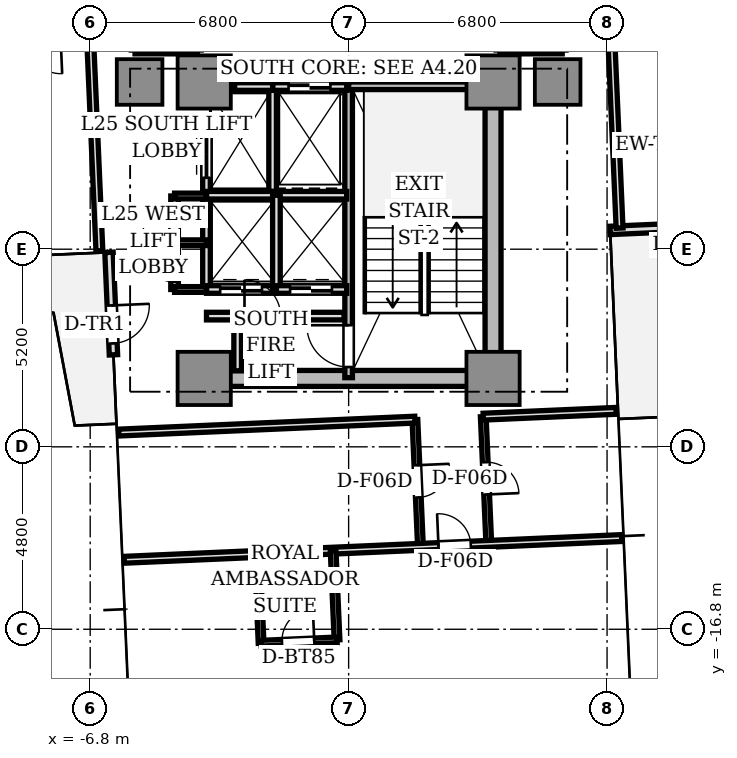
"""IFC4 building model, lengths in metres.
Left out: names, types, materials, properties, quantities, classifications, styles, units other than length and angle.
Written with IfcOpenShell. Run it as: python <this file> out.ifc"""

import sys

from ifc_helpers import new_model, si_unit, direction, frame, frame_2d, origin, origin_2d, place, context, subcontext, project, spatial, rectangle, extrude, source, transform, mapped, element, fill, save


model = new_model("IFC4")
c1 = context("Model", 3, precision=1e-05, world=origin(), true_north=direction((0.0, 1.0)))
c2 = subcontext(c1, "Body", "Model", "MODEL_VIEW")
j1 = project(units=[si_unit("LENGTHUNIT", "METRE"), si_unit("PLANEANGLEUNIT", "RADIAN")], contexts=[c1])
p1 = place(None, origin())
s1 = spatial("IfcSite", under=j1, at=p1, CompositionType="ELEMENT")
p2 = place(p1, origin())
s2 = spatial("IfcBuilding", under=s1, at=p2, CompositionType="ELEMENT")
p3 = place(p2, frame((0.0, 0.0, 93.55)))
s3 = spatial("IfcBuildingStorey", under=s2, at=p3, CompositionType="ELEMENT", Elevation=93.55)
p4 = place(p3, frame((-3.55, -10.2, 0.0), z_axis=(0.0, 0.0, 1.0), x_axis=(1.0, 0.0, 0.0)))
e1 = element("IfcWall", 1, at=p4, inside=s3, PredefinedType="SHEAR", context=c2, shape_type="SweptSolid", body=[
    extrude(rectangle(XDim=7.1, YDim=0.42, at=frame_2d((3.55, 0.0))), origin(), (0.0, 0.0, 1.0), 3.11),
])
p5 = place(p3, frame((3.8, -9.75, 0.0), z_axis=(0.0, 0.0, 1.0), x_axis=(0.0, 1.0, 0.0)))
e2 = element("IfcWall", 2, at=p5, inside=s3, PredefinedType="SHEAR", context=c2, shape_type="SweptSolid", body=[
    extrude(rectangle(XDim=6.9, YDim=0.42, at=frame_2d((3.45, 0.0))), origin(), (0.0, 0.0, 1.0), 3.11),
])
m1 = source(origin(), c2, "Body", "SweptSolid", [
    extrude(rectangle(XDim=1.4, YDim=1.4, at=origin_2d()), origin(), (0.0, 0.0, 1.0), 3.11),
])
for number, where, z_axis, x_axis in (
    (3, (-3.8, -2.4, 0.0), (0.0, 0.0, 1.0), (1.0, 0.0, 0.0)),
    (4, (3.8, -2.4, 0.0), (0.0, 0.0, 1.0), (1.0, 0.0, 0.0)),
    (5, (-3.8, -10.2, 0.0), (0.0, 0.0, 1.0), (1.0, 0.0, 0.0)),
    (6, (3.8, -10.2, 0.0), (0.0, 0.0, 1.0), (1.0, 0.0, 0.0)),
):
    element("IfcColumn", number, at=place(p3, frame(where, z_axis=z_axis, x_axis=x_axis)), inside=s3, PredefinedType="COLUMN", context=c2, shape_type="MappedRepresentation", body=[
        mapped(m1, transform((0.0, 0.0, 0.0), scale=1.0)),
    ])
m2 = source(origin(), c2, "Body", "SweptSolid", [
    extrude(rectangle(XDim=1.2, YDim=1.2, at=origin_2d()), origin(), (0.0, 0.0, 1.0), 3.11),
])
for number, where, z_axis, x_axis in (
    (7, (5.5, -2.4, 0.0), (0.0, 0.0, 1.0), (1.0, 0.0, 0.0)),
    (8, (-5.5, -2.4, 0.0), (0.0, 0.0, 1.0), (1.0, 0.0, 0.0)),
):
    element("IfcColumn", number, at=place(p3, frame(where, z_axis=z_axis, x_axis=x_axis)), inside=s3, PredefinedType="COLUMN", context=c2, shape_type="MappedRepresentation", body=[
        mapped(m2, transform((0.0, 0.0, 0.0), scale=1.0)),
    ])
p6 = place(p3, frame((6.882, -6.306, 0.0), z_axis=(0.0, 0.0, 1.0), x_axis=(0.999045894436, 0.043672655174, 0.0)))
e9 = element("IfcWall", 9, at=p6, inside=s3, PredefinedType="STANDARD", context=c2, shape_type="SweptSolid", body=[
    extrude(rectangle(XDim=2.7, YDim=0.22, at=frame_2d((1.35, 0.0))), origin(), (0.0, 0.0, 1.0), 3.11),
])
p7 = place(p6, frame((1.4, 0.0, 0.0)))
e10 = element("IfcOpeningElement", 10, at=p7, cuts=e9, PredefinedType="OPENING", context=c2, shape_type="SweptSolid", body=[
    extrude(rectangle(XDim=1.0, YDim=2.2, at=frame_2d((0.5, 1.1))), frame((0.0, 0.12, 0.0), z_axis=(0.0, -1.0, 0.0), x_axis=(1.0, 0.0, 0.0)), (0.0, 0.0, 1.0), 0.24),
])
p8 = place(p3, frame((-6.306, -6.882, 0.0), z_axis=(0.0, 0.0, 1.0), x_axis=(0.043672655174, -0.999045894436, 0.0)))
e11 = element("IfcWall", 11, at=p8, inside=s3, PredefinedType="STANDARD", context=c2, shape_type="SweptSolid", body=[
    extrude(rectangle(XDim=2.7, YDim=0.22, at=frame_2d((1.35, 0.0))), origin(), (0.0, 0.0, 1.0), 3.11),
])
p9 = place(p8, frame((1.4, 0.0, 0.0)))
e12 = element("IfcOpeningElement", 12, at=p9, cuts=e11, PredefinedType="OPENING", context=c2, shape_type="SweptSolid", body=[
    extrude(rectangle(XDim=1.0, YDim=2.2, at=frame_2d((0.5, 1.1))), frame((0.0, 0.12, 0.0), z_axis=(0.0, -1.0, 0.0), x_axis=(1.0, 0.0, 0.0)), (0.0, 0.0, 1.0), 0.24),
])
p10 = place(p3, frame((0.0, -10.18, 0.0), z_axis=(0.0, 0.0, 1.0), x_axis=(0.0, 1.0, 0.0)))
e13 = element("IfcWall", 13, at=p10, inside=s3, PredefinedType="SOLIDWALL", context=c2, shape_type="SweptSolid", body=[
    extrude(rectangle(XDim=7.68, YDim=0.2, at=frame_2d((3.84, 0.0))), origin(), (0.0, 0.0, 1.0), 3.11),
])
p11 = place(p10, frame((0.28, 0.0, 0.0)))
e14 = element("IfcOpeningElement", 14, at=p11, cuts=e13, PredefinedType="OPENING", context=c2, shape_type="SweptSolid", body=[
    extrude(rectangle(XDim=1.1, YDim=2.15, at=frame_2d((0.55, 1.075))), frame((0.0, 0.11, 0.0), z_axis=(0.0, -1.0, 0.0), x_axis=(1.0, 0.0, 0.0)), (0.0, 0.0, 1.0), 0.22),
])
p12 = place(p3, frame((0.0, -2.5, 0.0), z_axis=(0.0, 0.0, 1.0), x_axis=(1.0, 0.0, 0.0)))
e15 = element("IfcWall", 15, at=p12, inside=s3, PredefinedType="SOLIDWALL", context=c2, shape_type="SweptSolid", body=[
    extrude(rectangle(XDim=3.72, YDim=0.2, at=frame_2d((1.86, 0.0))), origin(), (0.0, 0.0, 1.0), 3.11),
])
p13 = place(p3, frame((-2.0, -5.28, 0.0), z_axis=(0.0, 0.0, 1.0), x_axis=(0.0, 1.0, 0.0)))
e16 = element("IfcWall", 16, at=p13, inside=s3, PredefinedType="SOLIDWALL", context=c2, shape_type="SweptSolid", body=[
    extrude(rectangle(XDim=2.78, YDim=0.2, at=frame_2d((1.39, 0.0))), origin(), (0.0, 0.0, 1.0), 2.66),
])
p14 = place(p3, frame((-2.0, -2.52, 0.0), z_axis=(0.0, 0.0, 1.0), x_axis=(1.0, 0.0, 0.0)))
e17 = element("IfcWall", 17, at=p14, inside=s3, PredefinedType="SOLIDWALL", context=c2, shape_type="SweptSolid", body=[
    extrude(rectangle(XDim=1.95, YDim=0.2, at=frame_2d((0.975, 0.0))), origin(), (0.0, 0.0, 1.0), 2.66),
])
p15 = place(p14, frame((0.42, 0.0, 0.0)))
e18 = element("IfcOpeningElement", 18, at=p15, cuts=e17, PredefinedType="OPENING", context=c2, shape_type="SweptSolid", body=[
    extrude(rectangle(XDim=1.1, YDim=2.2, at=frame_2d((0.55, 1.1))), frame((0.0, 0.11, 0.0), z_axis=(0.0, -1.0, 0.0), x_axis=(1.0, 0.0, 0.0)), (0.0, 0.0, 1.0), 0.22),
])
p16 = place(p3, frame((-3.0, -2.52, 0.0), z_axis=(0.0, 0.0, 1.0), x_axis=(1.0, 0.0, 0.0)))
e19 = element("IfcWall", 19, at=p16, inside=s3, PredefinedType="SOLIDWALL", context=c2, shape_type="SweptSolid", body=[
    extrude(rectangle(XDim=1.0, YDim=0.2, at=frame_2d((0.5, 0.0))), origin(), (0.0, 0.0, 1.0), 2.66),
])
p17 = place(p3, frame((-3.74, -5.36, 0.0), z_axis=(0.0, 0.0, 1.0), x_axis=(0.0, 1.0, 0.0)))
e20 = element("IfcWall", 20, at=p17, inside=s3, PredefinedType="SOLIDWALL", context=c2, shape_type="SweptSolid", body=[
    extrude(rectangle(XDim=2.08, YDim=0.2, at=frame_2d((1.04, 0.0))), origin(), (0.0, 0.0, 1.0), 2.66),
])
p18 = place(p17, frame((0.44, 0.0, 0.0)))
e21 = element("IfcOpeningElement", 21, at=p18, cuts=e20, PredefinedType="OPENING", context=c2, shape_type="SweptSolid", body=[
    extrude(rectangle(XDim=1.2, YDim=2.2, at=frame_2d((0.6, 1.1))), frame((0.0, 0.11, 0.0), z_axis=(0.0, -1.0, 0.0), x_axis=(1.0, 0.0, 0.0)), (0.0, 0.0, 1.0), 0.22),
])
p19 = place(p3, frame((-3.74, -7.86, 0.0), z_axis=(0.0, 0.0, 1.0), x_axis=(0.0, 1.0, 0.0)))
e22 = element("IfcWall", 22, at=p19, inside=s3, PredefinedType="SOLIDWALL", context=c2, shape_type="SweptSolid", body=[
    extrude(rectangle(XDim=2.48, YDim=0.2, at=frame_2d((1.24, 0.0))), origin(), (0.0, 0.0, 1.0), 2.66),
])
p20 = place(p3, frame((-3.74, -7.86, 0.0), z_axis=(0.0, 0.0, 1.0), x_axis=(1.0, 0.0, 0.0)))
e23 = element("IfcWall", 23, at=p20, inside=s3, PredefinedType="SOLIDWALL", context=c2, shape_type="SweptSolid", body=[
    extrude(rectangle(XDim=1.84, YDim=0.2, at=frame_2d((0.92, 0.0))), origin(), (0.0, 0.0, 1.0), 2.66),
])
p21 = place(p20, frame((0.36, 0.0, 0.0)))
e24 = element("IfcOpeningElement", 24, at=p21, cuts=e23, PredefinedType="OPENING", context=c2, shape_type="SweptSolid", body=[
    extrude(rectangle(XDim=1.1, YDim=2.2, at=frame_2d((0.55, 1.1))), frame((0.0, 0.11, 0.0), z_axis=(0.0, -1.0, 0.0), x_axis=(1.0, 0.0, 0.0)), (0.0, 0.0, 1.0), 0.22),
])
p22 = place(p3, frame((-3.74, -5.38, 0.0), z_axis=(0.0, 0.0, 1.0), x_axis=(1.0, 0.0, 0.0)))
e25 = element("IfcWall", 25, at=p22, inside=s3, PredefinedType="SOLIDWALL", context=c2, shape_type="SweptSolid", body=[
    extrude(rectangle(XDim=3.69, YDim=0.2, at=frame_2d((1.845, 0.0))), origin(), (0.0, 0.0, 1.0), 2.66),
])
p23 = place(p3, frame((-1.9, -7.86, 0.0), z_axis=(0.0, 0.0, 1.0), x_axis=(0.0, 1.0, 0.0)))
e26 = element("IfcWall", 26, at=p23, inside=s3, PredefinedType="SOLIDWALL", context=c2, shape_type="SweptSolid", body=[
    extrude(rectangle(XDim=2.48, YDim=0.2, at=frame_2d((1.24, 0.0))), origin(), (0.0, 0.0, 1.0), 2.66),
])
p24 = place(p3, frame((-1.9, -7.86, 0.0), z_axis=(0.0, 0.0, 1.0), x_axis=(1.0, 0.0, 0.0)))
e27 = element("IfcWall", 27, at=p24, inside=s3, PredefinedType="SOLIDWALL", context=c2, shape_type="SweptSolid", body=[
    extrude(rectangle(XDim=1.85, YDim=0.2, at=frame_2d((0.925, 0.0))), origin(), (0.0, 0.0, 1.0), 2.66),
])
p25 = place(p24, frame((0.36, 0.0, 0.0)))
e28 = element("IfcOpeningElement", 28, at=p25, cuts=e27, PredefinedType="OPENING", context=c2, shape_type="SweptSolid", body=[
    extrude(rectangle(XDim=1.1, YDim=2.2, at=frame_2d((0.55, 1.1))), frame((0.0, 0.11, 0.0), z_axis=(0.0, -1.0, 0.0), x_axis=(1.0, 0.0, 0.0)), (0.0, 0.0, 1.0), 0.22),
])
for number, where, z_axis, x_axis in (
    (29, (3.98, -1.56, 0.0), (0.0, 0.0, 1.0), (1.0, 0.0, 0.0)),
    (30, (-5.62, -1.56, 0.0), (0.0, 0.0, 1.0), (1.0, 0.0, 0.0)),
):
    element("IfcWall", number, at=place(p3, frame(where, z_axis=z_axis, x_axis=x_axis)), inside=s3, PredefinedType="SOLIDWALL", context=c2, shape_type="SweptSolid", body=[
        extrude(rectangle(XDim=1.64, YDim=0.2, at=frame_2d((0.82, 0.0))), origin(), (0.0, 0.0, 1.0), 2.66),
    ])
p26 = place(p3, frame((-3.74, -8.56, 0.0), z_axis=(0.0, 0.0, 1.0), x_axis=(1.0, 0.0, 0.0)))
e31 = element("IfcWall", 31, at=p26, inside=s3, PredefinedType="SOLIDWALL", context=c2, shape_type="SweptSolid", body=[
    extrude(rectangle(XDim=3.62, YDim=0.2, at=frame_2d((1.81, 0.0))), origin(), (0.0, 0.0, 1.0), 2.66),
])
p27 = place(p26, frame((1.0, 0.0, 0.0)))
e32 = element("IfcOpeningElement", 32, at=p27, cuts=e31, PredefinedType="OPENING", context=c2, shape_type="SweptSolid", body=[
    extrude(rectangle(XDim=0.95, YDim=2.15, at=frame_2d((0.475, 1.075))), frame((0.0, 0.11, 0.0), z_axis=(0.0, -1.0, 0.0), x_axis=(1.0, 0.0, 0.0)), (0.0, 0.0, 1.0), 0.22),
])
p28 = place(p3, frame((-2.92, -10.0, 0.0), z_axis=(0.0, 0.0, 1.0), x_axis=(0.0, 1.0, 0.0)))
e33 = element("IfcWall", 33, at=p28, inside=s3, PredefinedType="SOLIDWALL", context=c2, shape_type="SweptSolid", body=[
    extrude(rectangle(XDim=1.44, YDim=0.2, at=frame_2d((0.72, 0.0))), origin(), (0.0, 0.0, 1.0), 2.66),
])
p29 = place(p3, frame((-4.58, -7.86, 0.0), z_axis=(0.0, 0.0, 1.0), x_axis=(0.0, 1.0, 0.0)))
e34 = element("IfcWall", 34, at=p29, inside=s3, PredefinedType="SOLIDWALL", context=c2, shape_type="SweptSolid", body=[
    extrude(rectangle(XDim=2.46, YDim=0.2, at=frame_2d((1.23, 0.0))), origin(), (0.0, 0.0, 1.0), 2.66),
])
p30 = place(p29, frame((0.2, 0.0, 0.0)))
e35 = element("IfcOpeningElement", 35, at=p30, cuts=e34, PredefinedType="OPENING", context=c2, shape_type="SweptSolid", body=[
    extrude(rectangle(XDim=0.85, YDim=2.1, at=frame_2d((0.425, 1.05))), frame((0.0, 0.11, 0.0), z_axis=(0.0, -1.0, 0.0), x_axis=(1.0, 0.0, 0.0)), (0.0, 0.0, 1.0), 0.22),
])
p31 = place(p29, frame((1.38, 0.0, 0.0)))
e36 = element("IfcOpeningElement", 36, at=p31, cuts=e34, PredefinedType="OPENING", context=c2, shape_type="SweptSolid", body=[
    extrude(rectangle(XDim=0.85, YDim=2.1, at=frame_2d((0.425, 1.05))), frame((0.0, 0.11, 0.0), z_axis=(0.0, -1.0, 0.0), x_axis=(1.0, 0.0, 0.0)), (0.0, 0.0, 1.0), 0.22),
])
for number, where, z_axis, x_axis in (
    (37, (-4.58, -5.4, 0.0), (0.0, 0.0, 1.0), (1.0, 0.0, 0.0)),
    (38, (-4.58, -7.86, 0.0), (0.0, 0.0, 1.0), (1.0, 0.0, 0.0)),
    (39, (-4.58, -6.63, 0.0), (0.0, 0.0, 1.0), (1.0, 0.0, 0.0)),
):
    element("IfcWall", number, at=place(p3, frame(where, z_axis=z_axis, x_axis=x_axis)), inside=s3, PredefinedType="PARTITIONING", context=c2, shape_type="SweptSolid", body=[
        extrude(rectangle(XDim=0.84, YDim=0.15, at=frame_2d((0.42, 0.0))), origin(), (0.0, 0.0, 1.0), 2.66),
    ])
p32 = place(p3, frame((7.129, -6.245, 0.0), z_axis=(0.0, 0.0, 1.0), x_axis=(-0.043608291235, 0.999048705988, 0.0)))
e40 = element("IfcWall", 40, at=p32, inside=s3, PredefinedType="PARTITIONING", context=c2, shape_type="SweptSolid", body=[
    extrude(rectangle(XDim=10.9, YDim=0.18, at=frame_2d((5.45, 0.0))), origin(), (0.0, 0.0, 1.0), 2.66),
])
p33 = place(p3, frame((-6.8, -1.298, 0.0), z_axis=(0.0, 0.0, 1.0), x_axis=(0.04359376056, -0.999049340143, 0.0)))
e41 = element("IfcWall", 41, at=p33, inside=s3, PredefinedType="PARTITIONING", context=c2, shape_type="SweptSolid", body=[
    extrude(rectangle(XDim=5.55, YDim=0.18, at=frame_2d((2.775, 0.0))), origin(), (0.0, 0.0, 1.0), 2.66),
])
p34 = place(p3, frame((3.542, -11.206, 0.0), z_axis=(0.0, 0.0, 1.0), x_axis=(0.043582710367, -0.99904982226, 0.0)))
e42 = element("IfcWall", 42, at=p34, inside=s3, PredefinedType="PARTITIONING", context=c2, shape_type="SweptSolid", body=[
    extrude(rectangle(XDim=3.35, YDim=0.15, at=frame_2d((1.675, 0.0))), origin(), (0.0, 0.0, 1.0), 2.66),
])
p35 = place(p34, frame((1.2, 0.0, 0.0)))
e43 = element("IfcOpeningElement", 43, at=p35, cuts=e42, PredefinedType="OPENING", context=c2, shape_type="SweptSolid", body=[
    extrude(rectangle(XDim=0.85, YDim=2.1, at=frame_2d((0.425, 1.05))), frame((0.0, 0.085, 0.0), z_axis=(0.0, -1.0, 0.0), x_axis=(1.0, 0.0, 0.0)), (0.0, 0.0, 1.0), 0.17),
])
p36 = place(p3, frame((1.744, -11.285, 0.0), z_axis=(0.0, 0.0, 1.0), x_axis=(0.043579537274, -0.999049960678, 0.0)))
e44 = element("IfcWall", 44, at=p36, inside=s3, PredefinedType="PARTITIONING", context=c2, shape_type="SweptSolid", body=[
    extrude(rectangle(XDim=3.35, YDim=0.15, at=frame_2d((1.675, 0.0))), origin(), (0.0, 0.0, 1.0), 2.66),
])
p37 = place(p36, frame((1.2, 0.0, 0.0)))
e45 = element("IfcOpeningElement", 45, at=p37, cuts=e44, PredefinedType="OPENING", context=c2, shape_type="SweptSolid", body=[
    extrude(rectangle(XDim=0.85, YDim=2.1, at=frame_2d((0.425, 1.05))), frame((0.0, 0.085, 0.0), z_axis=(0.0, -1.0, 0.0), x_axis=(1.0, 0.0, 0.0)), (0.0, 0.0, 1.0), 0.17),
])
p38 = place(p3, frame((3.542, -11.206, 0.0), z_axis=(0.0, 0.0, 1.0), x_axis=(0.999046129111, 0.04366728647, 0.0)))
e46 = element("IfcWall", 46, at=p38, inside=s3, PredefinedType="PARTITIONING", context=c2, shape_type="SweptSolid", body=[
    extrude(rectangle(XDim=3.5, YDim=0.18, at=frame_2d((1.75, 0.0))), origin(), (0.0, 0.0, 1.0), 2.66),
])
p39 = place(p3, frame((-6.049, -11.625, 0.0), z_axis=(0.0, 0.0, 1.0), x_axis=(0.999047634936, 0.043632821702, 0.0)))
e47 = element("IfcWall", 47, at=p39, inside=s3, PredefinedType="PARTITIONING", context=c2, shape_type="SweptSolid", body=[
    extrude(rectangle(XDim=7.8, YDim=0.18, at=frame_2d((3.9, 0.0))), origin(), (0.0, 0.0, 1.0), 2.66),
])
p40 = place(p3, frame((-5.903, -14.972, 0.0), z_axis=(0.0, 0.0, 1.0), x_axis=(0.999048653727, 0.043609488494, 0.0)))
e48 = element("IfcWall", 48, at=p40, inside=s3, PredefinedType="PARTITIONING", context=c2, shape_type="SweptSolid", body=[
    extrude(rectangle(XDim=13.1, YDim=0.18, at=frame_2d((6.55, 0.0))), origin(), (0.0, 0.0, 1.0), 2.66),
])
p41 = place(p40, frame((8.275, 0.0, 0.0)))
e49 = element("IfcOpeningElement", 49, at=p41, cuts=e48, PredefinedType="OPENING", context=c2, shape_type="SweptSolid", body=[
    extrude(rectangle(XDim=0.85, YDim=2.1, at=frame_2d((0.425, 1.05))), frame((0.0, 0.1, 0.0), z_axis=(0.0, -1.0, 0.0), x_axis=(1.0, 0.0, 0.0)), (0.0, 0.0, 1.0), 0.2),
])
p42 = place(p3, frame((-0.408, -14.732, 0.0), z_axis=(0.0, 0.0, 1.0), x_axis=(0.043527387554, -0.999052234136, 0.0)))
e50 = element("IfcWall", 50, at=p42, inside=s3, PredefinedType="PARTITIONING", context=c2, shape_type="SweptSolid", body=[
    extrude(rectangle(XDim=2.35, YDim=0.15, at=frame_2d((1.175, 0.0))), origin(), (0.0, 0.0, 1.0), 2.66),
])
p43 = place(p3, frame((-2.406, -14.819, 0.0), z_axis=(0.0, 0.0, 1.0), x_axis=(0.04363560271, -0.999047513473, 0.0)))
e51 = element("IfcWall", 51, at=p43, inside=s3, PredefinedType="PARTITIONING", context=c2, shape_type="SweptSolid", body=[
    extrude(rectangle(XDim=2.35, YDim=0.15, at=frame_2d((1.175, 0.0))), origin(), (0.0, 0.0, 1.0), 2.66),
])
p44 = place(p3, frame((-2.303, -17.167, 0.0), z_axis=(0.0, 0.0, 1.0), x_axis=(0.999049929275, 0.043580257179, 0.0)))
e52 = element("IfcWall", 52, at=p44, inside=s3, PredefinedType="PARTITIONING", context=c2, shape_type="SweptSolid", body=[
    extrude(rectangle(XDim=2.0, YDim=0.15, at=frame_2d((1.0, 0.0))), origin(), (0.0, 0.0, 1.0), 2.66),
])
p45 = place(p44, frame((0.55, 0.0, 0.0)))
e53 = element("IfcOpeningElement", 53, at=p45, cuts=e52, PredefinedType="OPENING", context=c2, shape_type="SweptSolid", body=[
    extrude(rectangle(XDim=0.85, YDim=2.1, at=frame_2d((0.425, 1.05))), frame((0.0, 0.085, 0.0), z_axis=(0.0, -1.0, 0.0), x_axis=(1.0, 0.0, 0.0)), (0.0, 0.0, 1.0), 0.17),
])
m3 = source(origin(), c2, "Body", "SweptSolid", [
    extrude(rectangle(XDim=1.0, YDim=0.05, at=origin_2d()), origin(), (0.0, 0.0, 1.0), 2.2),
])
p46 = place(p9, frame((0.5, 0.0, 0.0)))
e54 = element("IfcDoor", 54, at=p46, inside=s3, OperationType="SINGLE_SWING_LEFT", PredefinedType="DOOR", context=c2, shape_type="MappedRepresentation", body=[
    mapped(m3, transform((0.0, 0.0, 0.0), scale=1.0)),
])
fill(e12, e54)
m4 = source(origin(), c2, "Body", "SweptSolid", [
    extrude(rectangle(XDim=1.1, YDim=0.05, at=origin_2d()), origin(), (0.0, 0.0, 1.0), 2.2),
])
p47 = place(p15, frame((0.55, 0.0, 0.0)))
e55 = element("IfcDoor", 55, at=p47, inside=s3, OperationType="DOUBLE_DOOR_SLIDING", PredefinedType="DOOR", context=c2, shape_type="MappedRepresentation", body=[
    mapped(m4, transform((0.0, 0.0, 0.0), scale=1.0)),
])
fill(e18, e55)
m5 = source(origin(), c2, "Body", "SweptSolid", [
    extrude(rectangle(XDim=1.2, YDim=0.05, at=origin_2d()), origin(), (0.0, 0.0, 1.0), 2.2),
])
p48 = place(p18, frame((0.6, 0.0, 0.0)))
e56 = element("IfcDoor", 56, at=p48, inside=s3, OperationType="DOUBLE_DOOR_SLIDING", PredefinedType="DOOR", context=c2, shape_type="MappedRepresentation", body=[
    mapped(m5, transform((0.0, 0.0, 0.0), scale=1.0)),
])
fill(e21, e56)
p49 = place(p21, frame((0.55, 0.0, 0.0)))
e57 = element("IfcDoor", 57, at=p49, inside=s3, OperationType="DOUBLE_DOOR_SLIDING", PredefinedType="DOOR", context=c2, shape_type="MappedRepresentation", body=[
    mapped(m4, transform((0.0, 0.0, 0.0), scale=1.0)),
])
fill(e24, e57)
p50 = place(p25, frame((0.55, 0.0, 0.0)))
e58 = element("IfcDoor", 58, at=p50, inside=s3, OperationType="DOUBLE_DOOR_SLIDING", PredefinedType="DOOR", context=c2, shape_type="MappedRepresentation", body=[
    mapped(m4, transform((0.0, 0.0, 0.0), scale=1.0)),
])
fill(e28, e58)
m6 = source(origin(), c2, "Body", "SweptSolid", [
    extrude(rectangle(XDim=1.1, YDim=0.05, at=origin_2d()), origin(), (0.0, 0.0, 1.0), 2.15),
])
p51 = place(p11, frame((0.55, 0.0, 0.0)))
e59 = element("IfcDoor", 59, at=p51, inside=s3, OperationType="SINGLE_SWING_RIGHT", PredefinedType="DOOR", context=c2, shape_type="MappedRepresentation", body=[
    mapped(m6, transform((0.0, 0.0, 0.0), scale=1.0)),
])
fill(e14, e59)
m7 = source(origin(), c2, "Body", "SweptSolid", [
    extrude(rectangle(XDim=0.95, YDim=0.05, at=origin_2d()), origin(), (0.0, 0.0, 1.0), 2.15),
])
p52 = place(p27, frame((0.475, 0.0, 0.0)))
e60 = element("IfcDoor", 60, at=p52, inside=s3, OperationType="SINGLE_SWING_LEFT", PredefinedType="DOOR", context=c2, shape_type="MappedRepresentation", body=[
    mapped(m7, transform((0.0, 0.0, 0.0), scale=1.0)),
])
fill(e32, e60)
m8 = source(origin(), c2, "Body", "SweptSolid", [
    extrude(rectangle(XDim=0.85, YDim=0.05, at=origin_2d()), origin(), (0.0, 0.0, 1.0), 2.1),
])
p53 = place(p30, frame((0.425, 0.0, 0.0)))
e61 = element("IfcDoor", 61, at=p53, inside=s3, OperationType="SINGLE_SWING_RIGHT", PredefinedType="DOOR", context=c2, shape_type="MappedRepresentation", body=[
    mapped(m8, transform((0.0, 0.0, 0.0), scale=1.0)),
])
fill(e35, e61)
p54 = place(p31, frame((0.425, 0.0, 0.0)))
e62 = element("IfcDoor", 62, at=p54, inside=s3, OperationType="SINGLE_SWING_LEFT", PredefinedType="DOOR", context=c2, shape_type="MappedRepresentation", body=[
    mapped(m8, transform((0.0, 0.0, 0.0), scale=1.0)),
])
fill(e36, e62)
p55 = place(p35, frame((0.425, 0.0, 0.0)))
e63 = element("IfcDoor", 63, at=p55, inside=s3, OperationType="SINGLE_SWING_RIGHT", PredefinedType="DOOR", context=c2, shape_type="MappedRepresentation", body=[
    mapped(m8, transform((0.0, 0.0, 0.0), scale=1.0)),
])
fill(e43, e63)
p56 = place(p37, frame((0.425, 0.0, 0.0)))
e64 = element("IfcDoor", 64, at=p56, inside=s3, OperationType="SINGLE_SWING_LEFT", PredefinedType="DOOR", context=c2, shape_type="MappedRepresentation", body=[
    mapped(m8, transform((0.0, 0.0, 0.0), scale=1.0)),
])
fill(e45, e64)
p57 = place(p45, frame((0.425, 0.0, 0.0)))
e65 = element("IfcDoor", 65, at=p57, inside=s3, OperationType="SINGLE_SWING_RIGHT", PredefinedType="DOOR", context=c2, shape_type="MappedRepresentation", body=[
    mapped(m8, transform((0.0, 0.0, 0.0), scale=1.0)),
])
fill(e53, e65)
p58 = place(p41, frame((0.425, 0.0, 0.0)))
e66 = element("IfcDoor", 66, at=p58, inside=s3, OperationType="SINGLE_SWING_LEFT", PredefinedType="DOOR", context=c2, shape_type="MappedRepresentation", body=[
    mapped(m8, transform((0.0, 0.0, 0.0), scale=1.0)),
])
fill(e49, e66)
save(model, sys.argv[1])
